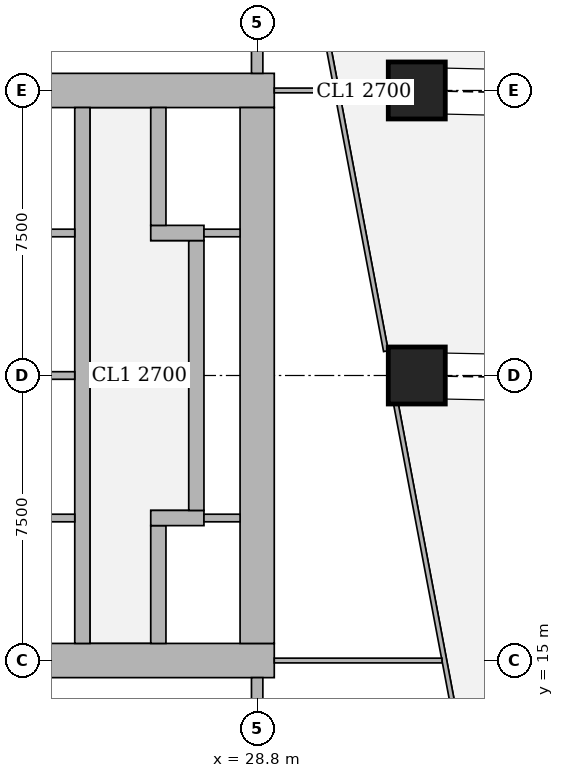
"""IFC4 building model, lengths in metres.
Left out: names, types, materials, properties, quantities, classifications, styles, units other than length and angle.
Written with IfcOpenShell. Run it as: python <this file> out.ifc"""

import sys

from ifc_helpers import new_model, si_unit, direction, frame, frame_2d, origin, origin_2d, place, context, subcontext, project, spatial, rectangle, extrude, element, fill, save


model = new_model("IFC4")
c1 = context("Model", 3, precision=1e-05, world=origin(), true_north=direction((0.0, 1.0)))
c2 = subcontext(c1, "Body", "Model", "MODEL_VIEW")
j1 = project(units=[si_unit("LENGTHUNIT", "METRE"), si_unit("PLANEANGLEUNIT", "RADIAN")], contexts=[c1])
p1 = place(None, origin())
s1 = spatial("IfcSite", under=j1, at=p1, CompositionType="ELEMENT")
p2 = place(p1, origin())
s2 = spatial("IfcBuilding", under=s1, at=p2, CompositionType="ELEMENT")
p3 = place(p2, frame((0.0, 0.0, 169.55)))
s3 = spatial("IfcBuildingStorey", under=s2, at=p3, CompositionType="ELEMENT", Elevation=169.55)
for number, where, z_axis, x_axis in (
    (1, (33.0, 22.5, 0.0), (0.0, 0.0, 1.0), (1.0, 0.0, 0.0)),
    (2, (33.0, 30.0, 0.0), (0.0, 0.0, 1.0), (1.0, 0.0, 0.0)),
):
    element("IfcColumn", number, at=place(p3, frame(where, z_axis=z_axis, x_axis=x_axis)), inside=s3, PredefinedType="COLUMN", context=c2, shape_type="SweptSolid", body=[
        extrude(rectangle(XDim=1.5, YDim=1.5, at=origin_2d()), origin(), (0.0, 0.0, 1.0), 3.75),
    ])
p4 = place(p3, frame((13.95, 15.0, 0.0), z_axis=(0.0, 0.0, 1.0), x_axis=(1.0, 0.0, 0.0)))
e3 = element("IfcWall", 3, at=p4, inside=s3, PredefinedType="SHEAR", context=c2, shape_type="SweptSolid", body=[
    extrude(rectangle(XDim=15.3, YDim=0.9, at=frame_2d((7.65, 0.0))), origin(), (0.0, 0.0, 1.0), 3.75),
])
p5 = place(p4, frame((4.45, 0.0, 0.0)))
e4 = element("IfcOpeningElement", 4, at=p5, cuts=e3, PredefinedType="OPENING", context=c2, shape_type="SweptSolid", body=[
    extrude(rectangle(XDim=1.8, YDim=2.1, at=frame_2d((0.9, 1.05))), frame((0.0, 0.46, 0.0), z_axis=(0.0, -1.0, 0.0), x_axis=(1.0, 0.0, 0.0)), (0.0, 0.0, 1.0), 0.92),
])
p6 = place(p4, frame((10.7, 0.0, 0.0)))
e5 = element("IfcOpeningElement", 5, at=p6, cuts=e3, PredefinedType="OPENING", context=c2, shape_type="SweptSolid", body=[
    extrude(rectangle(XDim=1.1, YDim=2.1, at=frame_2d((0.55, 1.05))), frame((0.0, 0.46, 0.0), z_axis=(0.0, -1.0, 0.0), x_axis=(1.0, 0.0, 0.0)), (0.0, 0.0, 1.0), 0.92),
])
p7 = place(p3, frame((13.95, 30.0, 0.0), z_axis=(0.0, 0.0, 1.0), x_axis=(1.0, 0.0, 0.0)))
e6 = element("IfcWall", 6, at=p7, inside=s3, PredefinedType="SHEAR", context=c2, shape_type="SweptSolid", body=[
    extrude(rectangle(XDim=15.3, YDim=0.9, at=frame_2d((7.65, 0.0))), origin(), (0.0, 0.0, 1.0), 3.75),
])
p8 = place(p7, frame((4.45, 0.0, 0.0)))
e7 = element("IfcOpeningElement", 7, at=p8, cuts=e6, PredefinedType="OPENING", context=c2, shape_type="SweptSolid", body=[
    extrude(rectangle(XDim=1.8, YDim=2.1, at=frame_2d((0.9, 1.05))), frame((0.0, 0.46, 0.0), z_axis=(0.0, -1.0, 0.0), x_axis=(1.0, 0.0, 0.0)), (0.0, 0.0, 1.0), 0.92),
])
p9 = place(p7, frame((10.7, 0.0, 0.0)))
e8 = element("IfcOpeningElement", 8, at=p9, cuts=e6, PredefinedType="OPENING", context=c2, shape_type="SweptSolid", body=[
    extrude(rectangle(XDim=1.1, YDim=2.1, at=frame_2d((0.55, 1.05))), frame((0.0, 0.46, 0.0), z_axis=(0.0, -1.0, 0.0), x_axis=(1.0, 0.0, 0.0)), (0.0, 0.0, 1.0), 0.92),
])
p10 = place(p3, frame((28.8, 15.45, 0.0), z_axis=(0.0, 0.0, 1.0), x_axis=(0.0, 1.0, 0.0)))
e9 = element("IfcWall", 9, at=p10, inside=s3, PredefinedType="SHEAR", context=c2, shape_type="SweptSolid", body=[
    extrude(rectangle(XDim=14.1, YDim=0.9, at=frame_2d((7.05, 0.0))), origin(), (0.0, 0.0, 1.0), 3.75),
])
p11 = place(p3, frame((24.2, 15.45, 0.0), z_axis=(0.0, 0.0, 1.0), x_axis=(0.0, 1.0, 0.0)))
e10 = element("IfcWall", 10, at=p11, inside=s3, PredefinedType="SHEAR", context=c2, shape_type="SweptSolid", body=[
    extrude(rectangle(XDim=14.1, YDim=0.4, at=frame_2d((7.05, 0.0))), origin(), (0.0, 0.0, 1.0), 3.75),
])
p12 = place(p3, frame((26.2, 15.45, 0.0), z_axis=(0.0, 0.0, 1.0), x_axis=(0.0, 1.0, 0.0)))
e11 = element("IfcWall", 11, at=p12, inside=s3, PredefinedType="SHEAR", context=c2, shape_type="SweptSolid", body=[
    extrude(rectangle(XDim=3.1, YDim=0.4, at=frame_2d((1.55, 0.0))), origin(), (0.0, 0.0, 1.0), 3.75),
])
p13 = place(p12, frame((0.825, 0.0, 0.0)))
e12 = element("IfcOpeningElement", 12, at=p13, cuts=e11, PredefinedType="OPENING", context=c2, shape_type="SweptSolid", body=[
    extrude(rectangle(XDim=1.2, YDim=2.1, at=frame_2d((0.6, 1.05))), frame((0.0, 0.21, 0.0), z_axis=(0.0, -1.0, 0.0), x_axis=(1.0, 0.0, 0.0)), (0.0, 0.0, 1.0), 0.42),
])
p14 = place(p3, frame((26.0, 18.75, 0.0), z_axis=(0.0, 0.0, 1.0), x_axis=(1.0, 0.0, 0.0)))
e13 = element("IfcWall", 13, at=p14, inside=s3, PredefinedType="SHEAR", context=c2, shape_type="SweptSolid", body=[
    extrude(rectangle(XDim=1.4, YDim=0.4, at=frame_2d((0.7, 0.0))), origin(), (0.0, 0.0, 1.0), 3.75),
])
p15 = place(p3, frame((27.2, 18.95, 0.0), z_axis=(0.0, 0.0, 1.0), x_axis=(0.0, 1.0, 0.0)))
e14 = element("IfcWall", 14, at=p15, inside=s3, PredefinedType="SHEAR", context=c2, shape_type="SweptSolid", body=[
    extrude(rectangle(XDim=7.1, YDim=0.4, at=frame_2d((3.55, 0.0))), origin(), (0.0, 0.0, 1.0), 3.75),
])
p16 = place(p3, frame((26.0, 26.25, 0.0), z_axis=(0.0, 0.0, 1.0), x_axis=(1.0, 0.0, 0.0)))
e15 = element("IfcWall", 15, at=p16, inside=s3, PredefinedType="SHEAR", context=c2, shape_type="SweptSolid", body=[
    extrude(rectangle(XDim=1.4, YDim=0.4, at=frame_2d((0.7, 0.0))), origin(), (0.0, 0.0, 1.0), 3.75),
])
p17 = place(p3, frame((26.2, 26.45, 0.0), z_axis=(0.0, 0.0, 1.0), x_axis=(0.0, 1.0, 0.0)))
e16 = element("IfcWall", 16, at=p17, inside=s3, PredefinedType="SHEAR", context=c2, shape_type="SweptSolid", body=[
    extrude(rectangle(XDim=3.1, YDim=0.4, at=frame_2d((1.55, 0.0))), origin(), (0.0, 0.0, 1.0), 3.75),
])
p18 = place(p17, frame((1.075, 0.0, 0.0)))
e17 = element("IfcOpeningElement", 17, at=p18, cuts=e16, PredefinedType="OPENING", context=c2, shape_type="SweptSolid", body=[
    extrude(rectangle(XDim=1.2, YDim=2.1, at=frame_2d((0.6, 1.05))), frame((0.0, 0.21, 0.0), z_axis=(0.0, -1.0, 0.0), x_axis=(1.0, 0.0, 0.0)), (0.0, 0.0, 1.0), 0.42),
])
for number, where, z_axis, x_axis in (
    (18, (28.8, 10.35, 0.0), (0.0, 0.0, 1.0), (0.0, 1.0, 0.0)),
    (19, (28.8, 30.45, 0.0), (0.0, 0.0, 1.0), (0.0, 1.0, 0.0)),
):
    element("IfcWall", number, at=place(p3, frame(where, z_axis=z_axis, x_axis=x_axis)), inside=s3, PredefinedType="SHEAR", context=c2, shape_type="SweptSolid", body=[
        extrude(rectangle(XDim=4.2, YDim=0.3, at=frame_2d((2.1, 0.0))), origin(), (0.0, 0.0, 1.0), 3.75),
    ])
p19 = place(p3, frame((33.877, 43.029, 0.0), z_axis=(0.0, 0.0, 1.0), x_axis=(0.185596841028, -0.98262597798, 0.0)))
e20 = element("IfcWall", 20, at=p19, inside=s3, PredefinedType="SOLIDWALL", context=c2, shape_type="SweptSolid", body=[
    extrude(rectangle(XDim=41.66, YDim=0.15, at=frame_2d((20.83, 0.0))), origin(), (0.0, 0.0, 1.0), 2.5),
])
p20 = place(p19, frame((8.63, 0.0, 0.0)))
e21 = element("IfcOpeningElement", 21, at=p20, cuts=e20, PredefinedType="OPENING", context=c2, shape_type="SweptSolid", body=[
    extrude(rectangle(XDim=1.0, YDim=2.1, at=frame_2d((0.5, 1.05))), frame((0.0, 0.085, 0.0), z_axis=(0.0, -1.0, 0.0), x_axis=(1.0, 0.0, 0.0)), (0.0, 0.0, 1.0), 0.17),
])
p21 = place(p19, frame((13.841, 0.0, 0.0)))
e22 = element("IfcOpeningElement", 22, at=p21, cuts=e20, PredefinedType="OPENING", context=c2, shape_type="SweptSolid", body=[
    extrude(rectangle(XDim=1.0, YDim=2.1, at=frame_2d((0.5, 1.05))), frame((0.0, 0.085, 0.0), z_axis=(0.0, -1.0, 0.0), x_axis=(1.0, 0.0, 0.0)), (0.0, 0.0, 1.0), 0.17),
])
p22 = place(p19, frame((21.474, 0.0, 0.0)))
e23 = element("IfcOpeningElement", 23, at=p22, cuts=e20, PredefinedType="OPENING", context=c2, shape_type="SweptSolid", body=[
    extrude(rectangle(XDim=1.0, YDim=2.1, at=frame_2d((0.5, 1.05))), frame((0.0, 0.085, 0.0), z_axis=(0.0, -1.0, 0.0), x_axis=(1.0, 0.0, 0.0)), (0.0, 0.0, 1.0), 0.17),
])
p23 = place(p19, frame((30.4, 0.0, 0.0)))
e24 = element("IfcOpeningElement", 24, at=p23, cuts=e20, PredefinedType="OPENING", context=c2, shape_type="SweptSolid", body=[
    extrude(rectangle(XDim=1.0, YDim=2.1, at=frame_2d((0.5, 1.05))), frame((0.0, 0.085, 0.0), z_axis=(0.0, -1.0, 0.0), x_axis=(1.0, 0.0, 0.0)), (0.0, 0.0, 1.0), 0.17),
])
p24 = place(p19, frame((32.288, 0.0, 0.0)))
e25 = element("IfcOpeningElement", 25, at=p24, cuts=e20, PredefinedType="OPENING", context=c2, shape_type="SweptSolid", body=[
    extrude(rectangle(XDim=1.0, YDim=2.1, at=frame_2d((0.5, 1.05))), frame((0.0, 0.085, 0.0), z_axis=(0.0, -1.0, 0.0), x_axis=(1.0, 0.0, 0.0)), (0.0, 0.0, 1.0), 0.17),
])
p25 = place(p3, frame((34.638, 10.174, 0.0), z_axis=(0.0, 0.0, 1.0), x_axis=(-0.185583626094, 0.982628473903, 0.0)))
e26 = element("IfcWall", 26, at=p25, inside=s3, PredefinedType="PARTITIONING", context=c2, shape_type="SweptSolid", body=[
    extrude(rectangle(XDim=11.767, YDim=0.125, at=frame_2d((5.884, 0.0))), origin(), (0.0, 0.0, 1.0), 3.5),
])
p26 = place(p25, frame((0.697, 0.0, 0.0)))
e27 = element("IfcOpeningElement", 27, at=p26, cuts=e26, PredefinedType="OPENING", context=c2, shape_type="SweptSolid", body=[
    extrude(rectangle(XDim=1.0, YDim=2.1, at=frame_2d((0.5, 1.05))), frame((0.0, 0.073, 0.0), z_axis=(0.0, -1.0, 0.0), x_axis=(1.0, 0.0, 0.0)), (0.0, 0.0, 1.0), 0.145),
])
p27 = place(p25, frame((5.734, 0.0, 0.0)))
e28 = element("IfcOpeningElement", 28, at=p27, cuts=e26, PredefinedType="OPENING", context=c2, shape_type="SweptSolid", body=[
    extrude(rectangle(XDim=1.0, YDim=2.1, at=frame_2d((0.5, 1.05))), frame((0.0, 0.073, 0.0), z_axis=(0.0, -1.0, 0.0), x_axis=(1.0, 0.0, 0.0)), (0.0, 0.0, 1.0), 0.145),
])
p28 = place(p3, frame((32.188, 23.141, 0.0), z_axis=(0.0, 0.0, 1.0), x_axis=(-0.185598625075, 0.98262564101, 0.0)))
e29 = element("IfcWall", 29, at=p28, inside=s3, PredefinedType="PARTITIONING", context=c2, shape_type="SweptSolid", body=[
    extrude(rectangle(XDim=11.891, YDim=0.125, at=frame_2d((5.946, 0.0))), origin(), (0.0, 0.0, 1.0), 3.5),
])
p29 = place(p28, frame((7.803, 0.0, 0.0)))
e30 = element("IfcOpeningElement", 30, at=p29, cuts=e29, PredefinedType="OPENING", context=c2, shape_type="SweptSolid", body=[
    extrude(rectangle(XDim=1.0, YDim=2.1, at=frame_2d((0.5, 1.05))), frame((0.0, 0.073, 0.0), z_axis=(0.0, -1.0, 0.0), x_axis=(1.0, 0.0, 0.0)), (0.0, 0.0, 1.0), 0.145),
])
p30 = place(p28, frame((10.246, 0.0, 0.0)))
e31 = element("IfcOpeningElement", 31, at=p30, cuts=e29, PredefinedType="OPENING", context=c2, shape_type="SweptSolid", body=[
    extrude(rectangle(XDim=1.0, YDim=2.1, at=frame_2d((0.5, 1.05))), frame((0.0, 0.073, 0.0), z_axis=(0.0, -1.0, 0.0), x_axis=(1.0, 0.0, 0.0)), (0.0, 0.0, 1.0), 0.145),
])
p31 = place(p3, frame((29.25, 15.0, 0.0), z_axis=(0.0, 0.0, 1.0), x_axis=(1.0, 0.0, 0.0)))
e32 = element("IfcWall", 32, at=p31, inside=s3, PredefinedType="PARTITIONING", context=c2, shape_type="SweptSolid", body=[
    extrude(rectangle(XDim=4.413, YDim=0.125, at=frame_2d((2.207, 0.0))), origin(), (0.0, 0.0, 1.0), 3.5),
])
p32 = place(p3, frame((29.25, 30.0, 0.0), z_axis=(0.0, 0.0, 1.0), x_axis=(1.0, 0.0, 0.0)))
e33 = element("IfcWall", 33, at=p32, inside=s3, PredefinedType="PARTITIONING", context=c2, shape_type="SweptSolid", body=[
    extrude(rectangle(XDim=1.579, YDim=0.125, at=frame_2d((0.79, 0.0))), origin(), (0.0, 0.0, 1.0), 3.5),
])
for number, where, z_axis, x_axis in (
    (34, (21.8, 18.75, 0.0), (0.0, 0.0, 1.0), (1.0, 0.0, 0.0)),
    (35, (21.8, 22.5, 0.0), (0.0, 0.0, 1.0), (1.0, 0.0, 0.0)),
    (36, (21.8, 26.25, 0.0), (0.0, 0.0, 1.0), (1.0, 0.0, 0.0)),
):
    element("IfcWall", number, at=place(p3, frame(where, z_axis=z_axis, x_axis=x_axis)), inside=s3, PredefinedType="SOLIDWALL", context=c2, shape_type="SweptSolid", body=[
        extrude(rectangle(XDim=2.2, YDim=0.2, at=frame_2d((1.1, 0.0))), origin(), (0.0, 0.0, 1.0), 3.5),
    ])
for number, where, z_axis, x_axis in (
    (37, (27.4, 18.75, 0.0), (0.0, 0.0, 1.0), (1.0, 0.0, 0.0)),
    (38, (27.4, 26.25, 0.0), (0.0, 0.0, 1.0), (1.0, 0.0, 0.0)),
):
    element("IfcWall", number, at=place(p3, frame(where, z_axis=z_axis, x_axis=x_axis)), inside=s3, PredefinedType="SOLIDWALL", context=c2, shape_type="SweptSolid", body=[
        extrude(rectangle(XDim=0.95, YDim=0.2, at=frame_2d((0.475, 0.0))), origin(), (0.0, 0.0, 1.0), 3.5),
    ])
p33 = place(p27, origin())
e39 = element("IfcDoor", 39, at=p33, inside=s3, OperationType="SINGLE_SWING_LEFT", PredefinedType="DOOR", context=c2, shape_type="SweptSolid", body=[
    extrude(rectangle(XDim=1.0, YDim=2.1, at=frame_2d((0.5, 1.05))), frame((0.0, 0.025, 0.0), z_axis=(0.0, -1.0, 0.0), x_axis=(1.0, 0.0, 0.0)), (0.0, 0.0, 1.0), 0.05),
])
fill(e28, e39)
p34 = place(p29, origin())
e40 = element("IfcDoor", 40, at=p34, inside=s3, OperationType="SINGLE_SWING_RIGHT", PredefinedType="DOOR", context=c2, shape_type="SweptSolid", body=[
    extrude(rectangle(XDim=1.0, YDim=2.1, at=frame_2d((0.5, 1.05))), frame((0.0, 0.025, 0.0), z_axis=(0.0, -1.0, 0.0), x_axis=(1.0, 0.0, 0.0)), (0.0, 0.0, 1.0), 0.05),
])
fill(e30, e40)
p35 = place(p6, origin())
e41 = element("IfcDoor", 41, at=p35, inside=s3, OperationType="SINGLE_SWING_RIGHT", PredefinedType="DOOR", context=c2, shape_type="SweptSolid", body=[
    extrude(rectangle(XDim=1.1, YDim=2.1, at=frame_2d((0.55, 1.05))), frame((0.0, 0.025, 0.0), z_axis=(0.0, -1.0, 0.0), x_axis=(1.0, 0.0, 0.0)), (0.0, 0.0, 1.0), 0.05),
])
fill(e5, e41)
p36 = place(p9, origin())
e42 = element("IfcDoor", 42, at=p36, inside=s3, OperationType="SINGLE_SWING_RIGHT", PredefinedType="DOOR", context=c2, shape_type="SweptSolid", body=[
    extrude(rectangle(XDim=1.1, YDim=2.1, at=frame_2d((0.55, 1.05))), frame((0.0, 0.025, 0.0), z_axis=(0.0, -1.0, 0.0), x_axis=(1.0, 0.0, 0.0)), (0.0, 0.0, 1.0), 0.05),
])
fill(e8, e42)
p37 = place(p13, origin())
e43 = element("IfcDoor", 43, at=p37, inside=s3, OperationType="DOUBLE_DOOR_SLIDING", PredefinedType="DOOR", context=c2, shape_type="SweptSolid", body=[
    extrude(rectangle(XDim=1.2, YDim=2.1, at=frame_2d((0.6, 1.05))), frame((0.0, 0.025, 0.0), z_axis=(0.0, -1.0, 0.0), x_axis=(1.0, 0.0, 0.0)), (0.0, 0.0, 1.0), 0.05),
])
fill(e12, e43)
p38 = place(p18, origin())
e44 = element("IfcDoor", 44, at=p38, inside=s3, OperationType="DOUBLE_DOOR_SLIDING", PredefinedType="DOOR", context=c2, shape_type="SweptSolid", body=[
    extrude(rectangle(XDim=1.2, YDim=2.1, at=frame_2d((0.6, 1.05))), frame((0.0, 0.025, 0.0), z_axis=(0.0, -1.0, 0.0), x_axis=(1.0, 0.0, 0.0)), (0.0, 0.0, 1.0), 0.05),
])
fill(e17, e44)
save(model, sys.argv[1])
